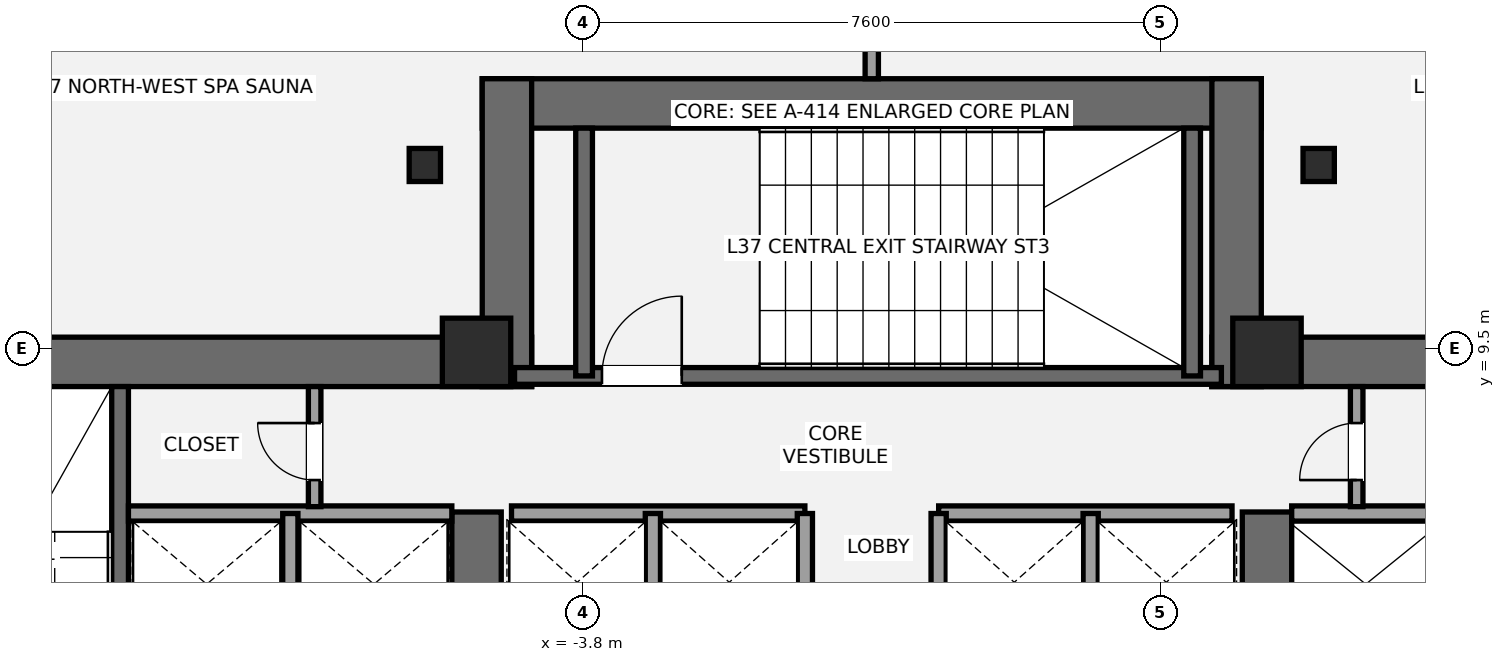
"""IFC4 building model, lengths in metres.
Left out: names, types, materials, properties, quantities, classifications, styles, units other than length and angle.
Written with IfcOpenShell. Run it as: python <this file> out.ifc"""

import sys

from ifc_helpers import new_model, si_unit, direction, frame, frame_2d, origin, origin_2d, place, context, subcontext, project, spatial, rectangle, i_section, extrude, element, fill, save


model = new_model("IFC4")
c1 = context("Model", 3, precision=1e-05, world=origin(), true_north=direction((0.0, 1.0)))
c2 = subcontext(c1, "Body", "Model", "MODEL_VIEW")
j1 = project(units=[si_unit("LENGTHUNIT", "METRE"), si_unit("PLANEANGLEUNIT", "RADIAN")], contexts=[c1])
p1 = place(None, origin())
s1 = spatial("IfcSite", under=j1, at=p1, CompositionType="ELEMENT")
p2 = place(p1, origin())
s2 = spatial("IfcBuilding", under=s1, at=p2, CompositionType="ELEMENT")
p3 = place(p2, frame((0.0, 0.0, 139.6)))
s3 = spatial("IfcBuildingStorey", under=s2, at=p3, CompositionType="ELEMENT", Elevation=139.6)
p4 = place(p3, frame((-13.8, 9.325, 0.0), z_axis=(0.0, 0.0, 1.0), x_axis=(1.0, 0.0, 0.0)))
e1 = element("IfcWall", 1, at=p4, inside=s3, PredefinedType="SHEAR", context=c2, shape_type="SweptSolid", body=[
    extrude(rectangle(XDim=9.325, YDim=0.65, at=frame_2d((4.663, 0.0))), origin(), (0.0, 0.0, 1.0), 4.2),
])
p5 = place(p3, frame((-5.2, 5.35, 0.0), z_axis=(0.0, 0.0, 1.0), x_axis=(0.0, 1.0, 0.0)))
e2 = element("IfcWall", 2, at=p5, inside=s3, PredefinedType="SHEAR", context=c2, shape_type="SweptSolid", body=[
    extrude(rectangle(XDim=2.0, YDim=0.65, at=frame_2d((1.0, 0.0))), origin(), (0.0, 0.0, 1.0), 4.2),
])
p6 = place(p3, frame((-9.89, 1.85, 0.0), z_axis=(0.0, 0.0, 1.0), x_axis=(0.0, 1.0, 0.0)))
e3 = element("IfcWall", 3, at=p6, inside=s3, PredefinedType="SHEAR", context=c2, shape_type="SweptSolid", body=[
    extrude(rectangle(XDim=7.15, YDim=0.22, at=frame_2d((3.575, 0.0))), origin(), (0.0, 0.0, 1.0), 4.2),
])
p7 = place(p3, frame((4.475, 9.325, 0.0), z_axis=(0.0, 0.0, 1.0), x_axis=(1.0, 0.0, 0.0)))
e4 = element("IfcWall", 4, at=p7, inside=s3, PredefinedType="SHEAR", context=c2, shape_type="SweptSolid", body=[
    extrude(rectangle(XDim=9.325, YDim=0.65, at=frame_2d((4.663, 0.0))), origin(), (0.0, 0.0, 1.0), 4.2),
])
p8 = place(p3, frame((5.2, 5.35, 0.0), z_axis=(0.0, 0.0, 1.0), x_axis=(0.0, 1.0, 0.0)))
e5 = element("IfcWall", 5, at=p8, inside=s3, PredefinedType="SHEAR", context=c2, shape_type="SweptSolid", body=[
    extrude(rectangle(XDim=2.0, YDim=0.65, at=frame_2d((1.0, 0.0))), origin(), (0.0, 0.0, 1.0), 4.2),
])
p9 = place(p3, frame((-5.125, 12.725, 0.0), z_axis=(0.0, 0.0, 1.0), x_axis=(1.0, 0.0, 0.0)))
e6 = element("IfcWall", 6, at=p9, inside=s3, PredefinedType="SHEAR", context=c2, shape_type="SweptSolid", body=[
    extrude(rectangle(XDim=10.25, YDim=0.65, at=frame_2d((5.125, 0.0))), origin(), (0.0, 0.0, 1.0), 4.2),
])
for number, where, z_axis, x_axis in (
    (7, (-4.8, 9.0, 0.0), (0.0, 0.0, 1.0), (0.0, 1.0, 0.0)),
    (8, (4.8, 9.0, 0.0), (0.0, 0.0, 1.0), (0.0, 1.0, 0.0)),
):
    element("IfcWall", number, at=place(p3, frame(where, z_axis=z_axis, x_axis=x_axis)), inside=s3, PredefinedType="SHEAR", context=c2, shape_type="SweptSolid", body=[
        extrude(rectangle(XDim=4.05, YDim=0.65, at=frame_2d((2.025, 0.0))), origin(), (0.0, 0.0, 1.0), 4.2),
    ])
p10 = place(p3, frame((-4.7, 9.14, 0.0), z_axis=(0.0, 0.0, 1.0), x_axis=(1.0, 0.0, 0.0)))
e9 = element("IfcWall", 9, at=p10, inside=s3, PredefinedType="SHEAR", context=c2, shape_type="SweptSolid", body=[
    extrude(rectangle(XDim=9.3, YDim=0.22, at=frame_2d((4.65, 0.0))), origin(), (0.0, 0.0, 1.0), 4.2),
])
p11 = place(p10, frame((1.15, 0.0, 0.0)))
e10 = element("IfcOpeningElement", 10, at=p11, cuts=e9, PredefinedType="OPENING", context=c2, shape_type="SweptSolid", body=[
    extrude(rectangle(XDim=1.05, YDim=2.15, at=frame_2d((0.525, 1.075))), frame((0.0, 0.12, 0.0), z_axis=(0.0, -1.0, 0.0), x_axis=(1.0, 0.0, 0.0)), (0.0, 0.0, 1.0), 0.24),
])
for number, where, z_axis, x_axis in (
    (11, (-3.785, 9.14, 0.0), (0.0, 0.0, 1.0), (0.0, 1.0, 0.0)),
    (12, (4.215, 9.14, 0.0), (0.0, 0.0, 1.0), (0.0, 1.0, 0.0)),
):
    element("IfcWall", number, at=place(p3, frame(where, z_axis=z_axis, x_axis=x_axis)), inside=s3, PredefinedType="SHEAR", context=c2, shape_type="SweptSolid", body=[
        extrude(rectangle(XDim=3.26, YDim=0.22, at=frame_2d((1.63, 0.0))), origin(), (0.0, 0.0, 1.0), 4.2),
    ])
for number, where, z_axis, x_axis in (
    (13, (-5.2, 9.45, 0.0), (0.0, 0.0, 1.0), (1.0, 0.0, 0.0)),
    (14, (5.2, 9.45, 0.0), (0.0, 0.0, 1.0), (1.0, 0.0, 0.0)),
):
    element("IfcColumn", number, at=place(p3, frame(where, z_axis=z_axis, x_axis=x_axis)), inside=s3, PredefinedType="COLUMN", context=c2, shape_type="SweptSolid", body=[
        extrude(rectangle(XDim=0.9, YDim=0.9, at=origin_2d()), origin(), (0.0, 0.0, 1.0), 4.2),
    ])
for number, where, z_axis, x_axis in (
    (15, (5.88, 11.915, 0.0), (0.0, 0.0, 1.0), (1.0, 0.0, 0.0)),
    (16, (-5.88, 11.915, 0.0), (0.0, 0.0, 1.0), (1.0, 0.0, 0.0)),
):
    element("IfcColumn", number, at=place(p3, frame(where, z_axis=z_axis, x_axis=x_axis)), inside=s3, PredefinedType="COLUMN", context=c2, shape_type="SweptSolid", body=[
        extrude(i_section(OverallWidth=0.412, OverallDepth=0.435, WebThickness=0.036, FlangeThickness=0.057, at=origin_2d()), origin(), (0.0, 0.0, 1.0), 4.2),
    ])
p12 = place(p3, frame((-9.78, 7.33, 0.0), z_axis=(0.0, 0.0, 1.0), x_axis=(1.0, 0.0, 0.0)))
e17 = element("IfcWall", 17, at=p12, inside=s3, PredefinedType="SOLIDWALL", context=c2, shape_type="SweptSolid", body=[
    extrude(rectangle(XDim=4.255, YDim=0.2, at=frame_2d((2.127, 0.0))), origin(), (0.0, 0.0, 1.0), 4.02),
])
p13 = place(p3, frame((-7.65, 5.47, 0.0), z_axis=(0.0, 0.0, 1.0), x_axis=(0.0, 1.0, 0.0)))
e18 = element("IfcWall", 18, at=p13, inside=s3, PredefinedType="SOLIDWALL", context=c2, shape_type="SweptSolid", body=[
    extrude(rectangle(XDim=1.86, YDim=0.2, at=frame_2d((0.93, 0.0))), origin(), (0.0, 0.0, 1.0), 4.02),
])
p14 = place(p3, frame((5.525, 7.33, 0.0), z_axis=(0.0, 0.0, 1.0), x_axis=(1.0, 0.0, 0.0)))
e19 = element("IfcWall", 19, at=p14, inside=s3, PredefinedType="SOLIDWALL", context=c2, shape_type="SweptSolid", body=[
    extrude(rectangle(XDim=4.255, YDim=0.2, at=frame_2d((2.127, 0.0))), origin(), (0.0, 0.0, 1.0), 4.02),
])
for number, where, z_axis, x_axis in (
    (20, (-4.74, 7.33, 0.0), (0.0, 0.0, 1.0), (1.0, 0.0, 0.0)),
    (21, (0.88, 7.33, 0.0), (0.0, 0.0, 1.0), (1.0, 0.0, 0.0)),
):
    element("IfcWall", number, at=place(p3, frame(where, z_axis=z_axis, x_axis=x_axis)), inside=s3, PredefinedType="SOLIDWALL", context=c2, shape_type="SweptSolid", body=[
        extrude(rectangle(XDim=3.86, YDim=0.2, at=frame_2d((1.93, 0.0))), origin(), (0.0, 0.0, 1.0), 4.02),
    ])
for number, where, z_axis, x_axis in (
    (22, (-2.88, 5.52, 0.0), (0.0, 0.0, 1.0), (0.0, 1.0, 0.0)),
    (23, (2.88, 5.52, 0.0), (0.0, 0.0, 1.0), (0.0, 1.0, 0.0)),
    (24, (-0.88, 5.52, 0.0), (0.0, 0.0, 1.0), (0.0, 1.0, 0.0)),
    (25, (0.88, 5.52, 0.0), (0.0, 0.0, 1.0), (0.0, 1.0, 0.0)),
):
    element("IfcWall", number, at=place(p3, frame(where, z_axis=z_axis, x_axis=x_axis)), inside=s3, PredefinedType="SOLIDWALL", context=c2, shape_type="SweptSolid", body=[
        extrude(rectangle(XDim=1.81, YDim=0.2, at=frame_2d((0.905, 0.0))), origin(), (0.0, 0.0, 1.0), 4.02),
    ])
p15 = place(p3, frame((-7.33, 7.42, 0.0), z_axis=(0.0, 0.0, 1.0), x_axis=(0.0, 1.0, 0.0)))
e26 = element("IfcWall", 26, at=p15, inside=s3, PredefinedType="PARTITIONING", context=c2, shape_type="SweptSolid", body=[
    extrude(rectangle(XDim=1.58, YDim=0.165, at=frame_2d((0.79, 0.0))), origin(), (0.0, 0.0, 1.0), 4.02),
])
p16 = place(p15, frame((0.35, 0.0, 0.0)))
e27 = element("IfcOpeningElement", 27, at=p16, cuts=e26, PredefinedType="OPENING", context=c2, shape_type="SweptSolid", body=[
    extrude(rectangle(XDim=0.75, YDim=2.1, at=frame_2d((0.375, 1.05))), frame((0.0, 0.093, 0.0), z_axis=(0.0, -1.0, 0.0), x_axis=(1.0, 0.0, 0.0)), (0.0, 0.0, 1.0), 0.185),
])
p17 = place(p3, frame((6.38, 7.42, 0.0), z_axis=(0.0, 0.0, 1.0), x_axis=(0.0, 1.0, 0.0)))
e28 = element("IfcWall", 28, at=p17, inside=s3, PredefinedType="PARTITIONING", context=c2, shape_type="SweptSolid", body=[
    extrude(rectangle(XDim=1.58, YDim=0.165, at=frame_2d((0.79, 0.0))), origin(), (0.0, 0.0, 1.0), 4.02),
])
p18 = place(p17, frame((0.35, 0.0, 0.0)))
e29 = element("IfcOpeningElement", 29, at=p18, cuts=e28, PredefinedType="OPENING", context=c2, shape_type="SweptSolid", body=[
    extrude(rectangle(XDim=0.75, YDim=2.1, at=frame_2d((0.375, 1.05))), frame((0.0, 0.093, 0.0), z_axis=(0.0, -1.0, 0.0), x_axis=(1.0, 0.0, 0.0)), (0.0, 0.0, 1.0), 0.185),
])
p19 = place(p3, frame((0.0, 13.05, 0.0), z_axis=(0.0, 0.0, 1.0), x_axis=(0.0, 1.0, 0.0)))
e30 = element("IfcWall", 30, at=p19, inside=s3, PredefinedType="PARTITIONING", context=c2, shape_type="SweptSolid", body=[
    extrude(rectangle(XDim=4.037, YDim=0.175, at=frame_2d((2.019, 0.0))), origin(), (0.0, 0.0, 1.0), 4.02),
])
p20 = place(p11, origin())
e31 = element("IfcDoor", 31, at=p20, inside=s3, OperationType="SINGLE_SWING_RIGHT", PredefinedType="DOOR", context=c2, shape_type="SweptSolid", body=[
    extrude(rectangle(XDim=1.05, YDim=2.15, at=frame_2d((0.525, 1.075))), frame((0.0, 0.025, 0.0), z_axis=(0.0, -1.0, 0.0), x_axis=(1.0, 0.0, 0.0)), (0.0, 0.0, 1.0), 0.05),
])
fill(e10, e31)
p21 = place(p16, origin())
e32 = element("IfcDoor", 32, at=p21, inside=s3, OperationType="SINGLE_SWING_RIGHT", PredefinedType="DOOR", context=c2, shape_type="SweptSolid", body=[
    extrude(rectangle(XDim=0.75, YDim=2.1, at=frame_2d((0.375, 1.05))), frame((0.0, 0.025, 0.0), z_axis=(0.0, -1.0, 0.0), x_axis=(1.0, 0.0, 0.0)), (0.0, 0.0, 1.0), 0.05),
])
fill(e27, e32)
p22 = place(p18, origin())
e33 = element("IfcDoor", 33, at=p22, inside=s3, OperationType="SINGLE_SWING_LEFT", PredefinedType="DOOR", context=c2, shape_type="SweptSolid", body=[
    extrude(rectangle(XDim=0.75, YDim=2.1, at=frame_2d((0.375, 1.05))), frame((0.0, 0.025, 0.0), z_axis=(0.0, -1.0, 0.0), x_axis=(1.0, 0.0, 0.0)), (0.0, 0.0, 1.0), 0.05),
])
fill(e29, e33)
save(model, sys.argv[1])
